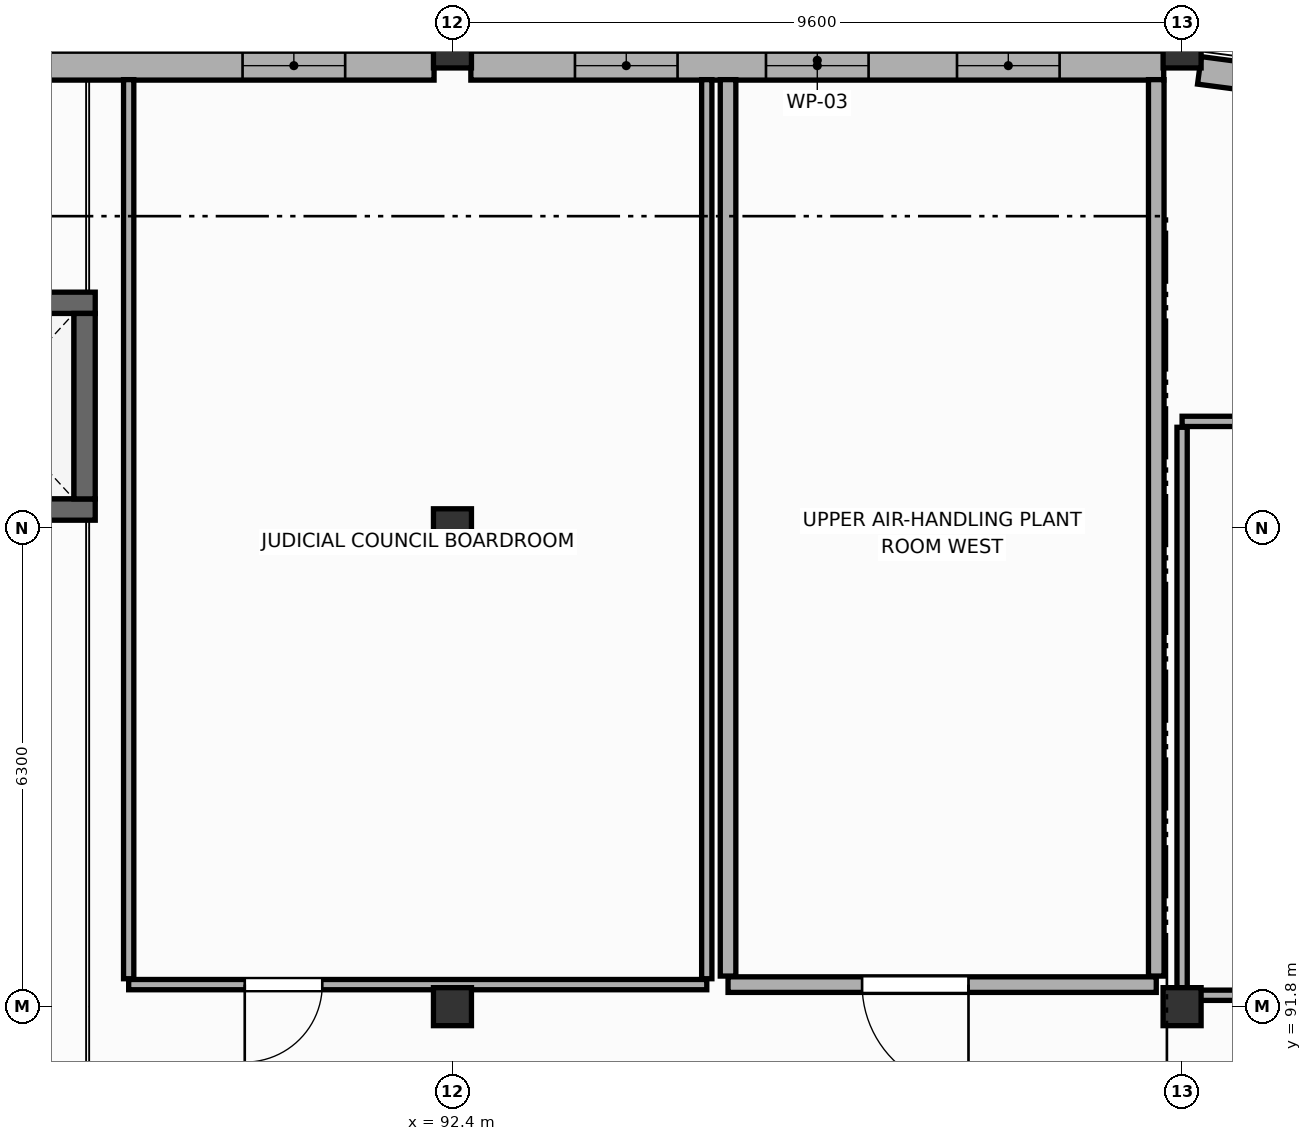
"""IFC4 building model, lengths in metres.
Left out: names, types, materials, properties, quantities, classifications, styles, units other than length and angle.
Written with IfcOpenShell. Run it as: python <this file> out.ifc"""

import sys

from ifc_helpers import new_model, si_unit, direction, frame, frame_2d, origin, origin_2d, place, context, subcontext, project, spatial, rectangle, extrude, element, fill, save


model = new_model("IFC4")
c1 = context("Model", 3, precision=1e-05, world=origin(), true_north=direction((0.0, 1.0)))
c2 = subcontext(c1, "Body", "Model", "MODEL_VIEW")
j1 = project(units=[si_unit("LENGTHUNIT", "METRE"), si_unit("PLANEANGLEUNIT", "RADIAN")], contexts=[c1])
p1 = place(None, origin())
s1 = spatial("IfcSite", under=j1, at=p1, CompositionType="ELEMENT")
p2 = place(p1, origin())
s2 = spatial("IfcBuilding", under=s1, at=p2, CompositionType="ELEMENT")
p3 = place(p2, frame((0.0, 0.0, 35.4)))
s3 = spatial("IfcBuildingStorey", under=s2, at=p3, CompositionType="ELEMENT", Elevation=35.4)
for number, where, z_axis, x_axis in (
    (1, (92.4, 91.8, 0.0), (0.0, 0.0, 1.0), (1.0, 0.0, 0.0)),
    (2, (92.4, 104.4, 0.0), (0.0, 0.0, 1.0), (1.0, 0.0, 0.0)),
    (3, (92.4, 98.1, 0.0), (0.0, 0.0, 1.0), (1.0, 0.0, 0.0)),
    (4, (102.0, 91.8, 0.0), (0.0, 0.0, 1.0), (1.0, 0.0, 0.0)),
    (5, (102.0, 104.4, 0.0), (0.0, 0.0, 1.0), (1.0, 0.0, 0.0)),
):
    element("IfcColumn", number, at=place(p3, frame(where, z_axis=z_axis, x_axis=x_axis)), inside=s3, PredefinedType="COLUMN", context=c2, shape_type="SweptSolid", body=[
        extrude(rectangle(XDim=0.5, YDim=0.5, at=origin_2d()), origin(), (0.0, 0.0, 1.0), 4.2),
    ])
p4 = place(p3, frame((84.242, 104.18, 0.0), z_axis=(0.0, 0.0, 1.0), x_axis=(1.0, 0.0, 0.0)))
e6 = element("IfcWall", 6, at=p4, inside=s3, PredefinedType="STANDARD", context=c2, shape_type="SweptSolid", body=[
    extrude(rectangle(XDim=7.916, YDim=0.38, at=frame_2d((3.958, 0.0))), origin(), (0.0, 0.0, 1.0), 3.095),
])
p5 = place(p4, frame((1.17, 0.0, 0.85)))
e7 = element("IfcOpeningElement", 7, at=p5, cuts=e6, PredefinedType="OPENING", context=c2, shape_type="SweptSolid", body=[
    extrude(rectangle(XDim=1.35, YDim=1.95, at=frame_2d((0.675, 0.975))), frame((0.0, 0.2, 0.0), z_axis=(0.0, -1.0, 0.0), x_axis=(1.0, 0.0, 0.0)), (0.0, 0.0, 1.0), 0.4),
])
p6 = place(p4, frame((5.396, 0.0, 0.85)))
e8 = element("IfcOpeningElement", 8, at=p6, cuts=e6, PredefinedType="OPENING", context=c2, shape_type="SweptSolid", body=[
    extrude(rectangle(XDim=1.35, YDim=1.95, at=frame_2d((0.675, 0.975))), frame((0.0, 0.2, 0.0), z_axis=(0.0, -1.0, 0.0), x_axis=(1.0, 0.0, 0.0)), (0.0, 0.0, 1.0), 0.4),
])
p7 = place(p3, frame((92.642, 104.18, 0.0), z_axis=(0.0, 0.0, 1.0), x_axis=(1.0, 0.0, 0.0)))
e9 = element("IfcWall", 9, at=p7, inside=s3, PredefinedType="STANDARD", context=c2, shape_type="SweptSolid", body=[
    extrude(rectangle(XDim=9.116, YDim=0.38, at=frame_2d((4.558, 0.0))), origin(), (0.0, 0.0, 1.0), 3.095),
])
p8 = place(p7, frame((1.37, 0.0, 0.85)))
e10 = element("IfcOpeningElement", 10, at=p8, cuts=e9, PredefinedType="OPENING", context=c2, shape_type="SweptSolid", body=[
    extrude(rectangle(XDim=1.35, YDim=1.95, at=frame_2d((0.675, 0.975))), frame((0.0, 0.2, 0.0), z_axis=(0.0, -1.0, 0.0), x_axis=(1.0, 0.0, 0.0)), (0.0, 0.0, 1.0), 0.4),
])
p9 = place(p7, frame((3.883, 0.0, 0.85)))
e11 = element("IfcOpeningElement", 11, at=p9, cuts=e9, PredefinedType="OPENING", context=c2, shape_type="SweptSolid", body=[
    extrude(rectangle(XDim=1.35, YDim=1.95, at=frame_2d((0.675, 0.975))), frame((0.0, 0.2, 0.0), z_axis=(0.0, -1.0, 0.0), x_axis=(1.0, 0.0, 0.0)), (0.0, 0.0, 1.0), 0.4),
])
p10 = place(p7, frame((6.396, 0.0, 0.85)))
e12 = element("IfcOpeningElement", 12, at=p10, cuts=e9, PredefinedType="OPENING", context=c2, shape_type="SweptSolid", body=[
    extrude(rectangle(XDim=1.35, YDim=1.95, at=frame_2d((0.675, 0.975))), frame((0.0, 0.2, 0.0), z_axis=(0.0, -1.0, 0.0), x_axis=(1.0, 0.0, 0.0)), (0.0, 0.0, 1.0), 0.4),
])
p11 = place(p3, frame((105.229, 103.723, 0.0), z_axis=(0.0, 0.0, 1.0), x_axis=(-0.991450452257, 0.130483718216, 0.0)))
e13 = element("IfcWall", 13, at=p11, inside=s3, PredefinedType="ELEMENTEDWALL", context=c2, shape_type="SweptSolid", body=[
    extrude(rectangle(XDim=3.027, YDim=0.365, at=frame_2d((1.514, 0.0))), origin(), (0.0, 0.0, 1.0), 3.095),
])
p12 = place(p11, frame((1.1, 0.0, 0.85)))
e14 = element("IfcOpeningElement", 14, at=p12, cuts=e13, PredefinedType="OPENING", context=c2, shape_type="SweptSolid", body=[
    extrude(rectangle(XDim=0.8, YDim=1.7, at=frame_2d((0.4, 0.85))), frame((0.0, 0.192, 0.0), z_axis=(0.0, -1.0, 0.0), x_axis=(1.0, 0.0, 0.0)), (0.0, 0.0, 1.0), 0.385),
])
p13 = place(p3, frame((58.8, 104.25, 4.2), z_axis=(0.0, 0.0, 1.0), x_axis=(1.0, 0.0, 0.0)))
e15 = element("IfcWall", 15, at=p13, inside=s3, PredefinedType="PARAPET", context=c2, shape_type="SweptSolid", body=[
    extrude(rectangle(XDim=43.2, YDim=0.245, at=frame_2d((21.6, 0.0))), origin(), (0.0, 0.0, 1.0), 1.15),
])
p14 = place(p3, frame((102.0, 103.9, 4.2), z_axis=(0.0, 0.0, 1.0), x_axis=(0.0, -1.0, 0.0)))
e16 = element("IfcWall", 16, at=p14, inside=s3, PredefinedType="PARAPET", context=c2, shape_type="SweptSolid", body=[
    extrude(rectangle(XDim=24.2, YDim=0.245, at=frame_2d((12.1, 0.0))), origin(), (0.0, 0.0, 1.0), 1.15),
])
p15 = place(p3, frame((84.54, 101.06, 0.0), z_axis=(0.0, 0.0, 1.0), x_axis=(1.0, 0.0, 0.0)))
e17 = element("IfcWall", 17, at=p15, inside=s3, PredefinedType="SHEAR", context=c2, shape_type="SweptSolid", body=[
    extrude(rectangle(XDim=3.16, YDim=0.28, at=frame_2d((1.58, 0.0))), origin(), (0.0, 0.0, 1.0), 3.98),
])
p16 = place(p3, frame((87.7, 98.34, 0.0), z_axis=(0.0, 0.0, 1.0), x_axis=(-1.0, 0.0, 0.0)))
e18 = element("IfcWall", 18, at=p16, inside=s3, PredefinedType="SHEAR", context=c2, shape_type="SweptSolid", body=[
    extrude(rectangle(XDim=3.16, YDim=0.28, at=frame_2d((1.58, 0.0))), origin(), (0.0, 0.0, 1.0), 3.98),
])
p17 = place(p16, frame((0.925, 0.0, 0.0)))
e19 = element("IfcOpeningElement", 19, at=p17, cuts=e18, PredefinedType="OPENING", context=c2, shape_type="SweptSolid", body=[
    extrude(rectangle(XDim=0.95, YDim=2.15, at=frame_2d((0.475, 1.075))), frame((0.0, 0.15, 0.0), z_axis=(0.0, -1.0, 0.0), x_axis=(1.0, 0.0, 0.0)), (0.0, 0.0, 1.0), 0.3),
])
p18 = place(p3, frame((87.56, 100.92, 0.0), z_axis=(0.0, 0.0, 1.0), x_axis=(0.0, -1.0, 0.0)))
e20 = element("IfcWall", 20, at=p18, inside=s3, PredefinedType="SHEAR", context=c2, shape_type="SweptSolid", body=[
    extrude(rectangle(XDim=2.44, YDim=0.28, at=frame_2d((1.22, 0.0))), origin(), (0.0, 0.0, 1.0), 3.98),
])
p19 = place(p3, frame((95.746, 92.09, 0.0), z_axis=(0.0, 0.0, 1.0), x_axis=(-1.0, 0.0, 0.0)))
e21 = element("IfcWall", 21, at=p19, inside=s3, PredefinedType="PARTITIONING", context=c2, shape_type="SweptSolid", body=[
    extrude(rectangle(XDim=7.606, YDim=0.135, at=frame_2d((3.803, 0.0))), origin(), (0.0, 0.0, 1.0), 3.295),
])
p20 = place(p19, frame((5.059, 0.0, 0.0)))
e22 = element("IfcOpeningElement", 22, at=p20, cuts=e21, PredefinedType="OPENING", context=c2, shape_type="SweptSolid", body=[
    extrude(rectangle(XDim=1.02, YDim=2.15, at=frame_2d((0.51, 1.075))), frame((0.0, 0.077, 0.0), z_axis=(0.0, -1.0, 0.0), x_axis=(1.0, 0.0, 0.0)), (0.0, 0.0, 1.0), 0.155),
])
p21 = place(p3, frame((88.14, 92.167, 0.0), z_axis=(0.0, 0.0, 1.0), x_axis=(0.0, 1.0, 0.0)))
e23 = element("IfcWall", 23, at=p21, inside=s3, PredefinedType="PARTITIONING", context=c2, shape_type="SweptSolid", body=[
    extrude(rectangle(XDim=11.829, YDim=0.135, at=frame_2d((5.914, 0.0))), origin(), (0.0, 0.0, 1.0), 3.395),
])
p22 = place(p3, frame((95.746, 103.996, 0.0), z_axis=(0.0, 0.0, 1.0), x_axis=(0.0, -1.0, 0.0)))
e24 = element("IfcWall", 24, at=p22, inside=s3, PredefinedType="PARTITIONING", context=c2, shape_type="SweptSolid", body=[
    extrude(rectangle(XDim=11.829, YDim=0.135, at=frame_2d((5.914, 0.0))), origin(), (0.0, 0.0, 1.0), 3.295),
])
p23 = place(p3, frame((101.66, 92.09, 0.0), z_axis=(0.0, 0.0, 1.0), x_axis=(-1.0, 0.0, 0.0)))
e25 = element("IfcWall", 25, at=p23, inside=s3, PredefinedType="STANDARD", context=c2, shape_type="SweptSolid", body=[
    extrude(rectangle(XDim=5.634, YDim=0.205, at=frame_2d((2.817, 0.0))), origin(), (0.0, 0.0, 1.0), 3.095),
])
p24 = place(p23, frame((2.47, 0.0, 0.0)))
e26 = element("IfcOpeningElement", 26, at=p24, cuts=e25, PredefinedType="OPENING", context=c2, shape_type="SweptSolid", body=[
    extrude(rectangle(XDim=1.4, YDim=2.25, at=frame_2d((0.7, 1.125))), frame((0.0, 0.113, 0.0), z_axis=(0.0, -1.0, 0.0), x_axis=(1.0, 0.0, 0.0)), (0.0, 0.0, 1.0), 0.225),
])
p25 = place(p3, frame((96.026, 92.202, 0.0), z_axis=(0.0, 0.0, 1.0), x_axis=(0.0, 1.0, 0.0)))
e27 = element("IfcWall", 27, at=p25, inside=s3, PredefinedType="STANDARD", context=c2, shape_type="SweptSolid", body=[
    extrude(rectangle(XDim=11.794, YDim=0.205, at=frame_2d((5.897, 0.0))), origin(), (0.0, 0.0, 1.0), 3.295),
])
p26 = place(p3, frame((101.66, 103.996, 0.0), z_axis=(0.0, 0.0, 1.0), x_axis=(0.0, -1.0, 0.0)))
e28 = element("IfcWall", 28, at=p26, inside=s3, PredefinedType="STANDARD", context=c2, shape_type="SweptSolid", body=[
    extrude(rectangle(XDim=11.794, YDim=0.205, at=frame_2d((5.897, 0.0))), origin(), (0.0, 0.0, 1.0), 3.095),
])
p27 = place(p3, frame((102.0, 99.5, 0.0), z_axis=(0.0, 0.0, 1.0), x_axis=(1.0, 0.0, 0.0)))
e29 = element("IfcWall", 29, at=p27, inside=s3, PredefinedType="PARTITIONING", context=c2, shape_type="SweptSolid", body=[
    extrude(rectangle(XDim=9.5, YDim=0.135, at=frame_2d((4.75, 0.0))), origin(), (0.0, 0.0, 1.0), 2.995),
])
p28 = place(p3, frame((111.5, 91.95, 0.0), z_axis=(0.0, 0.0, 1.0), x_axis=(-1.0, 0.0, 0.0)))
e30 = element("IfcWall", 30, at=p28, inside=s3, PredefinedType="PARTITIONING", context=c2, shape_type="SweptSolid", body=[
    extrude(rectangle(XDim=9.5, YDim=0.135, at=frame_2d((4.75, 0.0))), origin(), (0.0, 0.0, 1.0), 2.995),
])
p29 = place(p28, frame((1.135, 0.0, 0.0)))
e31 = element("IfcOpeningElement", 31, at=p29, cuts=e30, PredefinedType="OPENING", context=c2, shape_type="SweptSolid", body=[
    extrude(rectangle(XDim=0.95, YDim=2.15, at=frame_2d((0.475, 1.075))), frame((0.0, 0.077, 0.0), z_axis=(0.0, -1.0, 0.0), x_axis=(1.0, 0.0, 0.0)), (0.0, 0.0, 1.0), 0.155),
])
p30 = place(p3, frame((102.0, 92.028, 0.0), z_axis=(0.0, 0.0, 1.0), x_axis=(0.0, 1.0, 0.0)))
e32 = element("IfcWall", 32, at=p30, inside=s3, PredefinedType="PARTITIONING", context=c2, shape_type="SweptSolid", body=[
    extrude(rectangle(XDim=7.395, YDim=0.135, at=frame_2d((3.698, 0.0))), origin(), (0.0, 0.0, 1.0), 3.095),
])
p31 = place(p6, origin())
e33 = element("IfcWindow", 33, at=p31, inside=s3, PartitioningType="SINGLE_PANEL", PredefinedType="WINDOW", context=c2, shape_type="SweptSolid", body=[
    extrude(rectangle(XDim=1.35, YDim=1.95, at=frame_2d((0.675, 0.975))), frame((0.0, 0.03, 0.0), z_axis=(0.0, -1.0, 0.0), x_axis=(1.0, 0.0, 0.0)), (0.0, 0.0, 1.0), 0.06),
])
fill(e8, e33)
p32 = place(p8, origin())
e34 = element("IfcWindow", 34, at=p32, inside=s3, PartitioningType="SINGLE_PANEL", PredefinedType="WINDOW", context=c2, shape_type="SweptSolid", body=[
    extrude(rectangle(XDim=1.35, YDim=1.95, at=frame_2d((0.675, 0.975))), frame((0.0, 0.03, 0.0), z_axis=(0.0, -1.0, 0.0), x_axis=(1.0, 0.0, 0.0)), (0.0, 0.0, 1.0), 0.06),
])
fill(e10, e34)
p33 = place(p9, origin())
e35 = element("IfcWindow", 35, at=p33, inside=s3, PartitioningType="SINGLE_PANEL", PredefinedType="WINDOW", context=c2, shape_type="SweptSolid", body=[
    extrude(rectangle(XDim=1.35, YDim=1.95, at=frame_2d((0.675, 0.975))), frame((0.0, 0.03, 0.0), z_axis=(0.0, -1.0, 0.0), x_axis=(1.0, 0.0, 0.0)), (0.0, 0.0, 1.0), 0.06),
])
fill(e11, e35)
p34 = place(p10, origin())
e36 = element("IfcWindow", 36, at=p34, inside=s3, PartitioningType="SINGLE_PANEL", PredefinedType="WINDOW", context=c2, shape_type="SweptSolid", body=[
    extrude(rectangle(XDim=1.35, YDim=1.95, at=frame_2d((0.675, 0.975))), frame((0.0, 0.03, 0.0), z_axis=(0.0, -1.0, 0.0), x_axis=(1.0, 0.0, 0.0)), (0.0, 0.0, 1.0), 0.06),
])
fill(e12, e36)
p35 = place(p20, origin())
e37 = element("IfcDoor", 37, at=p35, inside=s3, OperationType="SINGLE_SWING_RIGHT", PredefinedType="DOOR", context=c2, shape_type="SweptSolid", body=[
    extrude(rectangle(XDim=1.02, YDim=2.15, at=frame_2d((0.51, 1.075))), frame((0.0, 0.025, 0.0), z_axis=(0.0, -1.0, 0.0), x_axis=(1.0, 0.0, 0.0)), (0.0, 0.0, 1.0), 0.05),
])
fill(e22, e37)
p36 = place(p24, origin())
e38 = element("IfcDoor", 38, at=p36, inside=s3, OperationType="SINGLE_SWING_LEFT", PredefinedType="DOOR", context=c2, shape_type="SweptSolid", body=[
    extrude(rectangle(XDim=1.4, YDim=2.25, at=frame_2d((0.7, 1.125))), frame((0.0, 0.025, 0.0), z_axis=(0.0, -1.0, 0.0), x_axis=(1.0, 0.0, 0.0)), (0.0, 0.0, 1.0), 0.05),
])
fill(e26, e38)
save(model, sys.argv[1])
